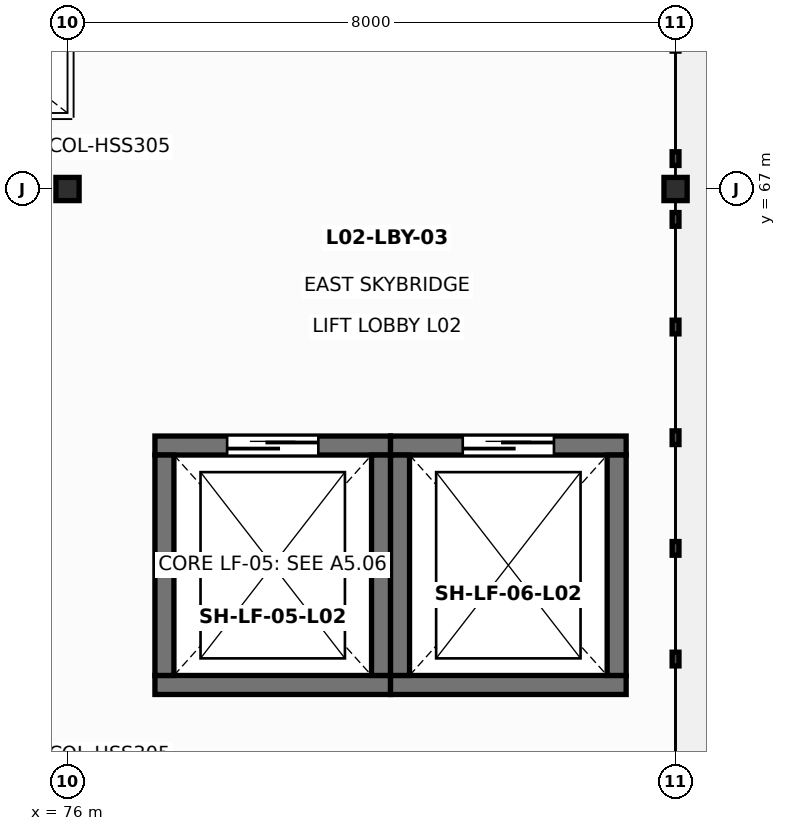
"""IFC4 building model, lengths in metres.
Left out: names, types, materials, properties, quantities, classifications, styles, units other than length and angle.
Written with IfcOpenShell. Run it as: python <this file> out.ifc"""

import sys

from ifc_helpers import new_model, si_unit, direction, frame, frame_2d, origin, origin_2d, place, context, subcontext, project, spatial, rectangle, hollow_rectangle, extrude, element, fill, save


model = new_model("IFC4")
c1 = context("Model", 3, precision=1e-05, world=origin(), true_north=direction((0.0, 1.0)))
c2 = subcontext(c1, "Body", "Model", "MODEL_VIEW")
j1 = project(units=[si_unit("LENGTHUNIT", "METRE"), si_unit("PLANEANGLEUNIT", "RADIAN")], contexts=[c1])
p1 = place(None, origin())
s1 = spatial("IfcSite", under=j1, at=p1, CompositionType="ELEMENT")
p2 = place(p1, origin())
s2 = spatial("IfcBuilding", under=s1, at=p2, CompositionType="ELEMENT")
p3 = place(p2, frame((0.0, 0.0, 11.2)))
s3 = spatial("IfcBuildingStorey", under=s2, at=p3, CompositionType="ELEMENT", Elevation=11.2)
p4 = place(p3, frame((76.0, 67.0, 0.0), z_axis=(0.0, 0.0, 1.0), x_axis=(1.0, 0.0, 0.0)))
e1 = element("IfcColumn", 1, at=p4, inside=s3, PredefinedType="COLUMN", context=c2, shape_type="SweptSolid", body=[
    extrude(hollow_rectangle(XDim=0.305, YDim=0.305, WallThickness=0.012, at=origin_2d()), origin(), (0.0, 0.0, 1.0), 6.15),
])
p5 = place(p3, frame((84.0, 67.0, 0.0), z_axis=(0.0, 0.0, 1.0), x_axis=(1.0, 0.0, 0.0)))
e2 = element("IfcColumn", 2, at=p5, inside=s3, PredefinedType="COLUMN", context=c2, shape_type="SweptSolid", body=[
    extrude(hollow_rectangle(XDim=0.305, YDim=0.305, WallThickness=0.012, at=origin_2d()), origin(), (0.0, 0.0, 1.0), 4.3),
])
p6 = place(p3, frame((77.15, 60.475, 0.0), z_axis=(0.0, 0.0, 1.0), x_axis=(1.0, 0.0, 0.0)))
e3 = element("IfcWall", 3, at=p6, inside=s3, PredefinedType="SOLIDWALL", context=c2, shape_type="SweptSolid", body=[
    extrude(rectangle(XDim=3.1, YDim=0.25, at=frame_2d((1.55, 0.0))), origin(), (0.0, 0.0, 1.0), 3.87),
])
p7 = place(p3, frame((80.25, 63.625, 0.0), z_axis=(0.0, 0.0, 1.0), x_axis=(-1.0, 0.0, 0.0)))
e4 = element("IfcWall", 4, at=p7, inside=s3, PredefinedType="SOLIDWALL", context=c2, shape_type="SweptSolid", body=[
    extrude(rectangle(XDim=3.1, YDim=0.25, at=frame_2d((1.55, 0.0))), origin(), (0.0, 0.0, 1.0), 3.87),
])
p8 = place(p7, frame((0.95, 0.0, 0.0)))
e5 = element("IfcOpeningElement", 5, at=p8, cuts=e4, PredefinedType="OPENING", context=c2, shape_type="SweptSolid", body=[
    extrude(rectangle(XDim=1.2, YDim=2.2, at=frame_2d((0.6, 1.1))), frame((0.0, 0.135, 0.0), z_axis=(0.0, -1.0, 0.0), x_axis=(1.0, 0.0, 0.0)), (0.0, 0.0, 1.0), 0.27),
])
for number, where, z_axis, x_axis in (
    (6, (80.125, 60.6, 0.0), (0.0, 0.0, 1.0), (0.0, 1.0, 0.0)),
    (7, (77.275, 63.5, 0.0), (0.0, 0.0, 1.0), (0.0, -1.0, 0.0)),
):
    element("IfcWall", number, at=place(p3, frame(where, z_axis=z_axis, x_axis=x_axis)), inside=s3, PredefinedType="SOLIDWALL", context=c2, shape_type="SweptSolid", body=[
        extrude(rectangle(XDim=2.9, YDim=0.25, at=frame_2d((1.45, 0.0))), origin(), (0.0, 0.0, 1.0), 3.87),
    ])
p9 = place(p3, frame((80.25, 60.475, 0.0), z_axis=(0.0, 0.0, 1.0), x_axis=(1.0, 0.0, 0.0)))
e8 = element("IfcWall", 8, at=p9, inside=s3, PredefinedType="SOLIDWALL", context=c2, shape_type="SweptSolid", body=[
    extrude(rectangle(XDim=3.1, YDim=0.25, at=frame_2d((1.55, 0.0))), origin(), (0.0, 0.0, 1.0), 3.87),
])
p10 = place(p3, frame((83.35, 63.625, 0.0), z_axis=(0.0, 0.0, 1.0), x_axis=(-1.0, 0.0, 0.0)))
e9 = element("IfcWall", 9, at=p10, inside=s3, PredefinedType="SOLIDWALL", context=c2, shape_type="SweptSolid", body=[
    extrude(rectangle(XDim=3.1, YDim=0.25, at=frame_2d((1.55, 0.0))), origin(), (0.0, 0.0, 1.0), 3.87),
])
p11 = place(p10, frame((0.95, 0.0, 0.0)))
e10 = element("IfcOpeningElement", 10, at=p11, cuts=e9, PredefinedType="OPENING", context=c2, shape_type="SweptSolid", body=[
    extrude(rectangle(XDim=1.2, YDim=2.2, at=frame_2d((0.6, 1.1))), frame((0.0, 0.135, 0.0), z_axis=(0.0, -1.0, 0.0), x_axis=(1.0, 0.0, 0.0)), (0.0, 0.0, 1.0), 0.27),
])
for number, where, z_axis, x_axis in (
    (11, (83.225, 60.6, 0.0), (0.0, 0.0, 1.0), (0.0, 1.0, 0.0)),
    (12, (80.375, 63.5, 0.0), (0.0, 0.0, 1.0), (0.0, -1.0, 0.0)),
):
    element("IfcWall", number, at=place(p3, frame(where, z_axis=z_axis, x_axis=x_axis)), inside=s3, PredefinedType="SOLIDWALL", context=c2, shape_type="SweptSolid", body=[
        extrude(rectangle(XDim=2.9, YDim=0.25, at=frame_2d((1.45, 0.0))), origin(), (0.0, 0.0, 1.0), 3.87),
    ])
p12 = place(p8, frame((1.2, 0.0, 0.0), z_axis=(0.0, 0.0, 1.0), x_axis=(-1.0, 0.0, 0.0)))
e13 = element("IfcDoor", 13, at=p12, inside=s3, OperationType="DOUBLE_DOOR_SLIDING", PredefinedType="DOOR", context=c2, shape_type="SweptSolid", body=[
    extrude(rectangle(XDim=1.2, YDim=2.2, at=frame_2d((0.6, 1.1))), frame((0.0, 0.025, 0.0), z_axis=(0.0, -1.0, 0.0), x_axis=(1.0, 0.0, 0.0)), (0.0, 0.0, 1.0), 0.05),
])
fill(e5, e13)
p13 = place(p11, frame((1.2, 0.0, 0.0), z_axis=(0.0, 0.0, 1.0), x_axis=(-1.0, 0.0, 0.0)))
e14 = element("IfcDoor", 14, at=p13, inside=s3, OperationType="DOUBLE_DOOR_SLIDING", PredefinedType="DOOR", context=c2, shape_type="SweptSolid", body=[
    extrude(rectangle(XDim=1.2, YDim=2.2, at=frame_2d((0.6, 1.1))), frame((0.0, 0.025, 0.0), z_axis=(0.0, -1.0, 0.0), x_axis=(1.0, 0.0, 0.0)), (0.0, 0.0, 1.0), 0.05),
])
fill(e10, e14)
save(model, sys.argv[1])
